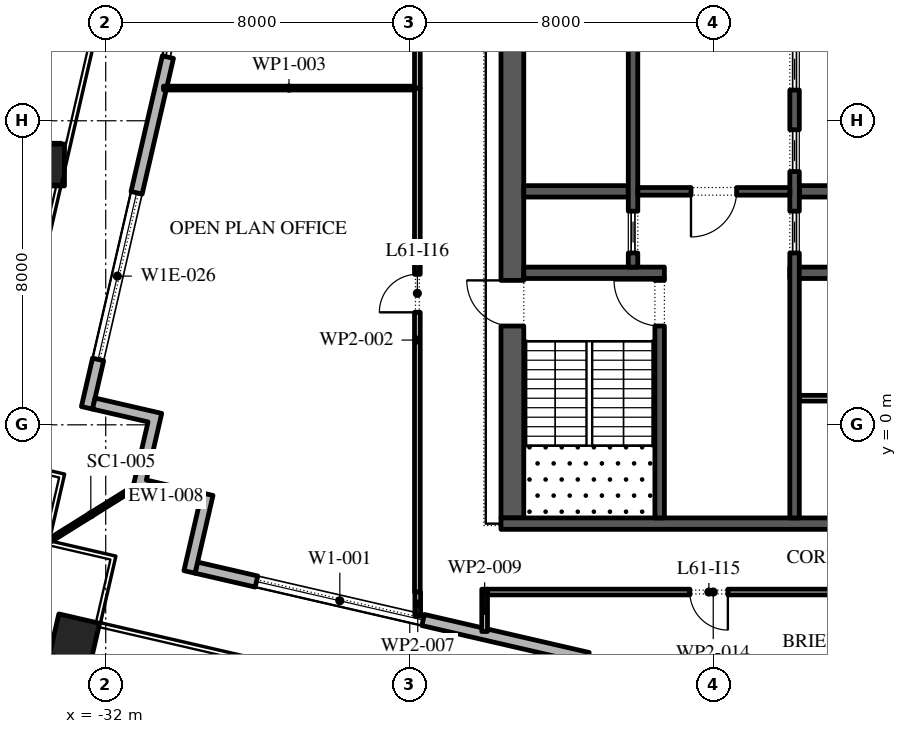
"""IFC4 building model, lengths in metres.
Left out: names, types, materials, properties, quantities, classifications, styles, units other than length and angle.
Written with IfcOpenShell. Run it as: python <this file> out.ifc"""

import sys

from ifc_helpers import new_model, si_unit, direction, frame, frame_2d, origin, origin_2d, place, context, subcontext, project, spatial, polyline, rectangle, outline, extrude, element, fill, save


model = new_model("IFC4")
c1 = context("Model", 3, precision=1e-05, world=origin(), true_north=direction((0.0, 1.0)))
c2 = subcontext(c1, "Body", "Model", "MODEL_VIEW")
j1 = project(units=[si_unit("LENGTHUNIT", "METRE"), si_unit("PLANEANGLEUNIT", "RADIAN")], contexts=[c1])
p1 = place(None, origin())
s1 = spatial("IfcSite", under=j1, at=p1, CompositionType="ELEMENT")
p2 = place(p1, origin())
s2 = spatial("IfcBuilding", under=s1, at=p2, CompositionType="ELEMENT")
p3 = place(p2, frame((0.0, 0.0, 280.8)))
s3 = spatial("IfcBuildingStorey", under=s2, at=p3, CompositionType="ELEMENT", Elevation=280.8)
p4 = place(p3, frame((-32.821, -5.635, 0.0), z_axis=(0.0, 0.0, 1.0), x_axis=(0.974370064785, -0.224951054344, 0.0)))
e1 = element("IfcColumn", 1, at=p4, inside=s3, PredefinedType="COLUMN", context=c2, shape_type="SweptSolid", body=[
    extrude(rectangle(XDim=1.1, YDim=1.1, at=origin_2d()), origin(), (0.0, 0.0, 1.0), 4.2),
])
p5 = place(p3, frame((-33.636, 6.836, 0.0), z_axis=(0.002906224189, 0.012671137464, 0.999915494498), x_axis=(-0.974691740237, 0.22355315143, 0.0)))
e2 = element("IfcColumn", 2, at=p5, inside=s3, PredefinedType="COLUMN", context=c2, shape_type="SweptSolid", body=[
    extrude(rectangle(XDim=1.1, YDim=1.1, at=origin_2d()), origin(), (0.0, 0.0, 1.0), 4.2),
])
p6 = place(p3, frame((-29.616, -3.758, 0.0), z_axis=(0.0, 0.0, 1.0), x_axis=(0.974370532314, -0.224949029246, 0.0)))
e3 = element("IfcWall", 3, at=p6, inside=s3, PredefinedType="STANDARD", context=c2, shape_type="SweptSolid", body=[
    extrude(rectangle(XDim=48.0, YDim=0.3, at=frame_2d((24.0, 0.0))), origin(), (0.0, 0.0, 1.0), 4.0),
])
p7 = place(p6, frame((1.625, 0.0, 0.45)))
e4 = element("IfcOpeningElement", 4, at=p7, cuts=e3, PredefinedType="OPENING", context=c2, shape_type="SweptSolid", body=[
    extrude(rectangle(XDim=4.5, YDim=3.05, at=frame_2d((2.25, 1.525))), frame((0.0, 0.16, 0.0), z_axis=(0.0, -1.0, 0.0), x_axis=(1.0, 0.0, 0.0)), (0.0, 0.0, 1.0), 0.32),
])
p8 = place(p6, frame((10.575, 0.0, 0.0)))
e5 = element("IfcOpeningElement", 5, at=p8, cuts=e3, PredefinedType="OPENING", context=c2, shape_type="SweptSolid", body=[
    extrude(rectangle(XDim=2.4, YDim=3.5, at=frame_2d((1.2, 1.75))), frame((0.0, 0.16, 0.0), z_axis=(0.0, -1.0, 0.0), x_axis=(1.0, 0.0, 0.0)), (0.0, 0.0, 1.0), 0.32),
])
p9 = place(p6, frame((17.575, 0.0, 0.45)))
e6 = element("IfcOpeningElement", 6, at=p9, cuts=e3, PredefinedType="OPENING", context=c2, shape_type="SweptSolid", body=[
    extrude(rectangle(XDim=4.5, YDim=3.0, at=frame_2d((2.25, 1.5))), frame((0.0, 0.16, 0.0), z_axis=(0.0, -1.0, 0.0), x_axis=(1.0, 0.0, 0.0)), (0.0, 0.0, 1.0), 0.32),
])
p10 = place(p6, frame((25.625, 0.0, 0.45)))
e7 = element("IfcOpeningElement", 7, at=p10, cuts=e3, PredefinedType="OPENING", context=c2, shape_type="SweptSolid", body=[
    extrude(rectangle(XDim=4.5, YDim=2.95, at=frame_2d((2.25, 1.475))), frame((0.0, 0.16, 0.0), z_axis=(0.0, -1.0, 0.0), x_axis=(1.0, 0.0, 0.0)), (0.0, 0.0, 1.0), 0.32),
])
p11 = place(p6, frame((33.675, 0.0, 0.45)))
e8 = element("IfcOpeningElement", 8, at=p11, cuts=e3, PredefinedType="OPENING", context=c2, shape_type="SweptSolid", body=[
    extrude(rectangle(XDim=4.5, YDim=2.825, at=frame_2d((2.25, 1.413))), frame((0.0, 0.16, 0.0), z_axis=(0.0, -1.0, 0.0), x_axis=(1.0, 0.0, 0.0)), (0.0, 0.0, 1.0), 0.32),
])
p12 = place(p6, frame((42.775, 0.0, 0.0)))
e9 = element("IfcOpeningElement", 9, at=p12, cuts=e3, PredefinedType="OPENING", context=c2, shape_type="SweptSolid", body=[
    extrude(rectangle(XDim=2.4, YDim=3.5, at=frame_2d((1.2, 1.75))), frame((0.0, 0.16, 0.0), z_axis=(0.0, -1.0, 0.0), x_axis=(1.0, 0.0, 0.0)), (0.0, 0.0, 1.0), 0.32),
])
p13 = place(p3, frame((-21.359, 48.678, 0.0), z_axis=(0.0, 0.0, 1.0), x_axis=(-0.224949198343, -0.974370493275, 0.0)))
e10 = element("IfcWall", 10, at=p13, inside=s3, PredefinedType="STANDARD", context=c2, shape_type="SweptSolid", body=[
    extrude(rectangle(XDim=49.5, YDim=0.3, at=frame_2d((24.75, 0.0))), origin(), (0.0, 0.0, 1.0), 4.0),
])
p14 = place(p13, frame((1.157, 0.0, 0.45)))
e11 = element("IfcOpeningElement", 11, at=p14, cuts=e10, PredefinedType="OPENING", context=c2, shape_type="SweptSolid", body=[
    extrude(rectangle(XDim=4.5, YDim=3.05, at=frame_2d((2.25, 1.525))), frame((0.0, 0.16, 0.0), z_axis=(0.0, -1.0, 0.0), x_axis=(1.0, 0.0, 0.0)), (0.0, 0.0, 1.0), 0.32),
])
p15 = place(p13, frame((9.171, 0.0, 0.0)))
e12 = element("IfcOpeningElement", 12, at=p15, cuts=e10, PredefinedType="OPENING", context=c2, shape_type="SweptSolid", body=[
    extrude(rectangle(XDim=2.4, YDim=3.5, at=frame_2d((1.2, 1.75))), frame((0.0, 0.16, 0.0), z_axis=(0.0, -1.0, 0.0), x_axis=(1.0, 0.0, 0.0)), (0.0, 0.0, 1.0), 0.32),
])
p16 = place(p13, frame((15.236, 0.0, 0.45)))
e13 = element("IfcOpeningElement", 13, at=p16, cuts=e10, PredefinedType="OPENING", context=c2, shape_type="SweptSolid", body=[
    extrude(rectangle(XDim=4.5, YDim=3.05, at=frame_2d((2.25, 1.525))), frame((0.0, 0.16, 0.0), z_axis=(0.0, -1.0, 0.0), x_axis=(1.0, 0.0, 0.0)), (0.0, 0.0, 1.0), 0.32),
])
p17 = place(p13, frame((22.35, 0.0, 0.45)))
e14 = element("IfcOpeningElement", 14, at=p17, cuts=e10, PredefinedType="OPENING", context=c2, shape_type="SweptSolid", body=[
    extrude(rectangle(XDim=4.5, YDim=3.05, at=frame_2d((2.25, 1.525))), frame((0.0, 0.16, 0.0), z_axis=(0.0, -1.0, 0.0), x_axis=(1.0, 0.0, 0.0)), (0.0, 0.0, 1.0), 0.32),
])
p18 = place(p13, frame((29.464, 0.0, 0.45)))
e15 = element("IfcOpeningElement", 15, at=p18, cuts=e10, PredefinedType="OPENING", context=c2, shape_type="SweptSolid", body=[
    extrude(rectangle(XDim=4.5, YDim=3.05, at=frame_2d((2.25, 1.525))), frame((0.0, 0.16, 0.0), z_axis=(0.0, -1.0, 0.0), x_axis=(1.0, 0.0, 0.0)), (0.0, 0.0, 1.0), 0.32),
])
p19 = place(p13, frame((37.628, 0.0, 0.0)))
e16 = element("IfcOpeningElement", 16, at=p19, cuts=e10, PredefinedType="OPENING", context=c2, shape_type="SweptSolid", body=[
    extrude(rectangle(XDim=2.4, YDim=3.325, at=frame_2d((1.2, 1.663))), frame((0.0, 0.16, 0.0), z_axis=(0.0, -1.0, 0.0), x_axis=(1.0, 0.0, 0.0)), (0.0, 0.0, 1.0), 0.32),
])
p20 = place(p13, frame((43.693, 0.0, 0.45)))
e17 = element("IfcOpeningElement", 17, at=p20, cuts=e10, PredefinedType="OPENING", context=c2, shape_type="SweptSolid", body=[
    extrude(rectangle(XDim=4.5, YDim=2.825, at=frame_2d((2.25, 1.413))), frame((0.0, 0.16, 0.0), z_axis=(0.0, -1.0, 0.0), x_axis=(1.0, 0.0, 0.0)), (0.0, 0.0, 1.0), 0.32),
])
p21 = place(p3, origin())
e18 = element("IfcWall", 18, at=p21, inside=s3, PredefinedType="STANDARD", context=c2, shape_type="SweptSolid", body=[
    extrude(outline(polyline([(-31.291, -1.678), (-30.886, 0.076), (-32.348, 0.413), (-32.28, 0.705), (-30.526, 0.301), (-30.931, -1.453), (-29.177, -1.858), (-29.65, -3.905), (-29.942, -3.837), (-29.537, -2.083), (-31.291, -1.678)])), origin(), (0.0, 0.0, 1.0), 4.0),
])
p22 = place(p3, frame((-31.291, -1.678, -0.05), z_axis=(0.0, 0.0, 1.0), x_axis=(-0.84807753525, -0.529872148923, 0.0)))
e19 = element("IfcWall", 19, at=p22, inside=s3, PredefinedType="STANDARD", context=c2, shape_type="SweptSolid", body=[
    extrude(rectangle(XDim=2.596, YDim=0.1, at=frame_2d((1.298, 0.0))), origin(), (0.0, 0.0, 1.0), 4.05),
])
p23 = place(p3, frame((-21.3, -2.45, 0.0), z_axis=(0.0, 0.0, 1.0), x_axis=(0.0, 1.0, 0.0)))
e20 = element("IfcWall", 20, at=p23, inside=s3, PredefinedType="SHEAR", context=c2, shape_type="SweptSolid", body=[
    extrude(rectangle(XDim=27.9, YDim=0.6, at=frame_2d((13.95, 0.0))), origin(), (0.0, 0.0, 1.0), 4.0),
])
p24 = place(p23, frame((5.05, 0.0, 0.0)))
e21 = element("IfcOpeningElement", 21, at=p24, cuts=e20, PredefinedType="OPENING", context=c2, shape_type="SweptSolid", body=[
    extrude(rectangle(XDim=1.2, YDim=2.1, at=frame_2d((0.6, 1.05))), frame((0.0, 0.31, 0.0), z_axis=(0.0, -1.0, 0.0), x_axis=(1.0, 0.0, 0.0)), (0.0, 0.0, 1.0), 0.62),
])
p25 = place(p23, frame((21.65, 0.0, 0.0)))
e22 = element("IfcOpeningElement", 22, at=p25, cuts=e20, PredefinedType="OPENING", context=c2, shape_type="SweptSolid", body=[
    extrude(rectangle(XDim=1.2, YDim=2.1, at=frame_2d((0.6, 1.05))), frame((0.0, 0.31, 0.0), z_axis=(0.0, -1.0, 0.0), x_axis=(1.0, 0.0, 0.0)), (0.0, 0.0, 1.0), 0.62),
])
p26 = place(p3, frame((-21.6, -2.6, 0.0), z_axis=(0.0, 0.0, 1.0), x_axis=(1.0, 0.0, 0.0)))
e23 = element("IfcWall", 23, at=p26, inside=s3, PredefinedType="SHEAR", context=c2, shape_type="SweptSolid", body=[
    extrude(rectangle(XDim=11.2, YDim=0.3, at=frame_2d((5.6, 0.0))), origin(), (0.0, 0.0, 1.0), 4.0),
])
p27 = place(p3, frame((-21.0, 4.0, 0.0), z_axis=(0.0, 0.0, 1.0), x_axis=(1.0, 0.0, 0.0)))
e24 = element("IfcWall", 24, at=p27, inside=s3, PredefinedType="SHEAR", context=c2, shape_type="SweptSolid", body=[
    extrude(rectangle(XDim=3.7, YDim=0.3, at=frame_2d((1.85, 0.0))), origin(), (0.0, 0.0, 1.0), 4.0),
])
p28 = place(p3, frame((-17.425, -2.45, 0.0), z_axis=(0.0, 0.0, 1.0), x_axis=(0.0, 1.0, 0.0)))
e25 = element("IfcWall", 25, at=p28, inside=s3, PredefinedType="SHEAR", context=c2, shape_type="SweptSolid", body=[
    extrude(rectangle(XDim=6.3, YDim=0.25, at=frame_2d((3.15, 0.0))), origin(), (0.0, 0.0, 1.0), 4.0),
])
p29 = place(p28, frame((5.05, 0.0, 0.0)))
e26 = element("IfcOpeningElement", 26, at=p29, cuts=e25, PredefinedType="OPENING", context=c2, shape_type="SweptSolid", body=[
    extrude(rectangle(XDim=1.2, YDim=2.1, at=frame_2d((0.6, 1.05))), frame((0.0, 0.135, 0.0), z_axis=(0.0, -1.0, 0.0), x_axis=(1.0, 0.0, 0.0)), (0.0, 0.0, 1.0), 0.27),
])
p30 = place(p3, frame((-21.0, 6.143, 0.0), z_axis=(0.0, 0.0, 1.0), x_axis=(1.0, 0.0, 0.0)))
e27 = element("IfcWall", 27, at=p30, inside=s3, PredefinedType="SHEAR", context=c2, shape_type="SweptSolid", body=[
    extrude(rectangle(XDim=2.75, YDim=0.3, at=frame_2d((1.375, 0.0))), origin(), (0.0, 0.0, 1.0), 4.0),
])
p31 = place(p3, frame((-18.125, 4.15, 0.0), z_axis=(0.0, 0.0, 1.0), x_axis=(0.0, 1.0, 0.0)))
e28 = element("IfcWall", 28, at=p31, inside=s3, PredefinedType="SHEAR", context=c2, shape_type="SweptSolid", body=[
    extrude(rectangle(XDim=14.7, YDim=0.25, at=frame_2d((7.35, 0.0))), origin(), (0.0, 0.0, 1.0), 4.0),
])
p32 = place(p31, frame((6.9, 0.0, 0.0)))
e29 = element("IfcOpeningElement", 29, at=p32, cuts=e28, PredefinedType="OPENING", context=c2, shape_type="SweptSolid", body=[
    extrude(rectangle(XDim=0.9, YDim=2.1, at=frame_2d((0.45, 1.05))), frame((0.0, 0.135, 0.0), z_axis=(0.0, -1.0, 0.0), x_axis=(1.0, 0.0, 0.0)), (0.0, 0.0, 1.0), 0.27),
])
p33 = place(p31, frame((0.371, 0.0, 0.0)))
e30 = element("IfcOpeningElement", 30, at=p33, cuts=e28, PredefinedType="OPENING", context=c2, shape_type="SweptSolid", body=[
    extrude(rectangle(XDim=1.1, YDim=2.1, at=frame_2d((0.55, 1.05))), frame((0.0, 0.135, 0.0), z_axis=(0.0, -1.0, 0.0), x_axis=(1.0, 0.0, 0.0)), (0.0, 0.0, 1.0), 0.27),
])
p34 = place(p31, frame((13.229, 0.0, 0.0)))
e31 = element("IfcOpeningElement", 31, at=p34, cuts=e28, PredefinedType="OPENING", context=c2, shape_type="SweptSolid", body=[
    extrude(rectangle(XDim=1.1, YDim=2.1, at=frame_2d((0.55, 1.05))), frame((0.0, 0.135, 0.0), z_axis=(0.0, -1.0, 0.0), x_axis=(1.0, 0.0, 0.0)), (0.0, 0.0, 1.0), 0.27),
])
p35 = place(p3, frame((-14.0, 4.0, 0.0), z_axis=(0.0, 0.0, 1.0), x_axis=(1.0, 0.0, 0.0)))
e32 = element("IfcWall", 32, at=p35, inside=s3, PredefinedType="SHEAR", context=c2, shape_type="SweptSolid", body=[
    extrude(rectangle(XDim=3.0, YDim=0.3, at=frame_2d((1.5, 0.0))), origin(), (0.0, 0.0, 1.0), 4.0),
])
p36 = place(p3, frame((-13.75, 6.143, 0.0), z_axis=(0.0, 0.0, 1.0), x_axis=(1.0, 0.0, 0.0)))
e33 = element("IfcWall", 33, at=p36, inside=s3, PredefinedType="SHEAR", context=c2, shape_type="SweptSolid", body=[
    extrude(rectangle(XDim=2.75, YDim=0.3, at=frame_2d((1.375, 0.0))), origin(), (0.0, 0.0, 1.0), 4.0),
])
p37 = place(p3, frame((-13.875, -2.45, 0.0), z_axis=(0.0, 0.0, 1.0), x_axis=(0.0, 1.0, 0.0)))
e34 = element("IfcWall", 34, at=p37, inside=s3, PredefinedType="SHEAR", context=c2, shape_type="SweptSolid", body=[
    extrude(rectangle(XDim=21.3, YDim=0.25, at=frame_2d((10.65, 0.0))), origin(), (0.0, 0.0, 1.0), 4.0),
])
p38 = place(p37, frame((17.786, 0.0, 0.0)))
e35 = element("IfcOpeningElement", 35, at=p38, cuts=e34, PredefinedType="OPENING", context=c2, shape_type="SweptSolid", body=[
    extrude(rectangle(XDim=0.9, YDim=2.1, at=frame_2d((0.45, 1.05))), frame((0.0, 0.135, 0.0), z_axis=(0.0, -1.0, 0.0), x_axis=(1.0, 0.0, 0.0)), (0.0, 0.0, 1.0), 0.27),
])
p39 = place(p37, frame((6.971, 0.0, 0.0)))
e36 = element("IfcOpeningElement", 36, at=p39, cuts=e34, PredefinedType="OPENING", context=c2, shape_type="SweptSolid", body=[
    extrude(rectangle(XDim=1.1, YDim=2.1, at=frame_2d((0.55, 1.05))), frame((0.0, 0.135, 0.0), z_axis=(0.0, -1.0, 0.0), x_axis=(1.0, 0.0, 0.0)), (0.0, 0.0, 1.0), 0.27),
])
p40 = place(p37, frame((9.114, 0.0, 0.0)))
e37 = element("IfcOpeningElement", 37, at=p40, cuts=e34, PredefinedType="OPENING", context=c2, shape_type="SweptSolid", body=[
    extrude(rectangle(XDim=1.1, YDim=2.1, at=frame_2d((0.55, 1.05))), frame((0.0, 0.135, 0.0), z_axis=(0.0, -1.0, 0.0), x_axis=(1.0, 0.0, 0.0)), (0.0, 0.0, 1.0), 0.27),
])
p41 = place(p37, frame((11.257, 0.0, 0.0)))
e38 = element("IfcOpeningElement", 38, at=p41, cuts=e34, PredefinedType="OPENING", context=c2, shape_type="SweptSolid", body=[
    extrude(rectangle(XDim=1.1, YDim=2.1, at=frame_2d((0.55, 1.05))), frame((0.0, 0.135, 0.0), z_axis=(0.0, -1.0, 0.0), x_axis=(1.0, 0.0, 0.0)), (0.0, 0.0, 1.0), 0.27),
])
p42 = place(p37, frame((13.4, 0.0, 0.0)))
e39 = element("IfcOpeningElement", 39, at=p42, cuts=e34, PredefinedType="OPENING", context=c2, shape_type="SweptSolid", body=[
    extrude(rectangle(XDim=1.1, YDim=2.1, at=frame_2d((0.55, 1.05))), frame((0.0, 0.135, 0.0), z_axis=(0.0, -1.0, 0.0), x_axis=(1.0, 0.0, 0.0)), (0.0, 0.0, 1.0), 0.27),
])
p43 = place(p3, frame((-18.0, 6.143, 0.0), z_axis=(0.0, 0.0, 1.0), x_axis=(1.0, 0.0, 0.0)))
e40 = element("IfcWall", 40, at=p43, inside=s3, PredefinedType="SHEAR", context=c2, shape_type="SweptSolid", body=[
    extrude(rectangle(XDim=4.0, YDim=0.2, at=frame_2d((2.0, 0.0))), origin(), (0.0, 0.0, 1.0), 4.0),
])
p44 = place(p43, frame((1.4, 0.0, 0.0)))
e41 = element("IfcOpeningElement", 41, at=p44, cuts=e40, PredefinedType="OPENING", context=c2, shape_type="SweptSolid", body=[
    extrude(rectangle(XDim=1.2, YDim=2.1, at=frame_2d((0.6, 1.05))), frame((0.0, 0.11, 0.0), z_axis=(0.0, -1.0, 0.0), x_axis=(1.0, 0.0, 0.0)), (0.0, 0.0, 1.0), 0.22),
])
p45 = place(p3, frame((-13.75, 0.7, 0.0), z_axis=(0.0, 0.0, 1.0), x_axis=(1.0, 0.0, 0.0)))
e42 = element("IfcWall", 42, at=p45, inside=s3, PredefinedType="PARTITIONING", context=c2, shape_type="SweptSolid", body=[
    extrude(rectangle(XDim=2.75, YDim=0.15, at=frame_2d((1.375, 0.0))), origin(), (0.0, 0.0, 1.0), 4.0),
])
p46 = place(p3, frame((-23.8, -4.4, 0.0), z_axis=(0.0, 0.0, 1.0), x_axis=(0.0, 1.0, 0.0)))
e43 = element("IfcWall", 43, at=p46, inside=s3, PredefinedType="PARTITIONING", context=c2, shape_type="SweptSolid", body=[
    extrude(rectangle(XDim=13.26, YDim=0.15, at=frame_2d((6.63, 0.0))), origin(), (0.0, 0.0, 1.0), 4.0),
])
p47 = place(p46, frame((7.36, 0.0, 0.0)))
e44 = element("IfcOpeningElement", 44, at=p47, cuts=e43, PredefinedType="OPENING", context=c2, shape_type="SweptSolid", body=[
    extrude(rectangle(XDim=1.0, YDim=2.1, at=frame_2d((0.5, 1.05))), frame((0.0, 0.085, 0.0), z_axis=(0.0, -1.0, 0.0), x_axis=(1.0, 0.0, 0.0)), (0.0, 0.0, 1.0), 0.17),
])
p48 = place(p3, frame((-23.875, 8.86, 0.0), z_axis=(0.0, 0.0, 1.0), x_axis=(-1.0, 0.0, 0.0)))
e45 = element("IfcWall", 45, at=p48, inside=s3, PredefinedType="PARTITIONING", context=c2, shape_type="SweptSolid", body=[
    extrude(rectangle(XDim=6.605, YDim=0.1, at=frame_2d((3.302, 0.0))), origin(), (0.0, 0.0, 1.0), 4.0),
])
p49 = place(p3, frame((-23.8, 8.86, 0.0), z_axis=(0.0, 0.0, 1.0), x_axis=(0.0, 1.0, 0.0)))
e46 = element("IfcWall", 46, at=p49, inside=s3, PredefinedType="PARTITIONING", context=c2, shape_type="SweptSolid", body=[
    extrude(rectangle(XDim=20.875, YDim=0.15, at=frame_2d((10.438, 0.0))), origin(), (0.0, 0.0, 1.0), 4.0),
])
p50 = place(p49, frame((7.9, 0.0, 0.0)))
e47 = element("IfcOpeningElement", 47, at=p50, cuts=e46, PredefinedType="OPENING", context=c2, shape_type="SweptSolid", body=[
    extrude(rectangle(XDim=1.0, YDim=2.1, at=frame_2d((0.5, 1.05))), frame((0.0, 0.085, 0.0), z_axis=(0.0, -1.0, 0.0), x_axis=(1.0, 0.0, 0.0)), (0.0, 0.0, 1.0), 0.17),
])
p51 = place(p3, frame((-23.79, -5.032, 0.0), z_axis=(0.0, 0.0, 1.0), x_axis=(0.0, 1.0, 0.0)))
e48 = element("IfcWall", 48, at=p51, inside=s3, PredefinedType="PARTITIONING", context=c2, shape_type="SweptSolid", body=[
    extrude(rectangle(XDim=0.632, YDim=0.15, at=frame_2d((0.316, 0.0))), origin(), (0.0, 0.0, 1.0), 4.0),
])
p52 = place(p3, frame((-22.03, -4.325, 0.0), z_axis=(0.0, 0.0, 1.0), x_axis=(0.0, -1.0, 0.0)))
e49 = element("IfcWall", 49, at=p52, inside=s3, PredefinedType="PARTITIONING", context=c2, shape_type="SweptSolid", body=[
    extrude(rectangle(XDim=1.113, YDim=0.15, at=frame_2d((0.557, 0.0))), origin(), (0.0, 0.0, 1.0), 4.0),
])
p53 = place(p3, frame((-10.075, -4.4, 0.0), z_axis=(0.0, 0.0, 1.0), x_axis=(-1.0, 0.0, 0.0)))
e50 = element("IfcWall", 50, at=p53, inside=s3, PredefinedType="PARTITIONING", context=c2, shape_type="SweptSolid", body=[
    extrude(rectangle(XDim=11.88, YDim=0.15, at=frame_2d((5.94, 0.0))), origin(), (0.0, 0.0, 1.0), 4.0),
])
p54 = place(p53, frame((5.555, 0.0, 0.0)))
e51 = element("IfcOpeningElement", 51, at=p54, cuts=e50, PredefinedType="OPENING", context=c2, shape_type="SweptSolid", body=[
    extrude(rectangle(XDim=1.0, YDim=2.1, at=frame_2d((0.5, 1.05))), frame((0.0, 0.085, 0.0), z_axis=(0.0, -1.0, 0.0), x_axis=(1.0, 0.0, 0.0)), (0.0, 0.0, 1.0), 0.17),
])
p55 = place(p7, origin())
e52 = element("IfcWindow", 52, at=p55, inside=s3, PartitioningType="DOUBLE_PANEL_VERTICAL", PredefinedType="WINDOW", context=c2, shape_type="SweptSolid", body=[
    extrude(rectangle(XDim=4.5, YDim=3.05, at=frame_2d((2.25, 1.525))), frame((0.0, 0.03, 0.0), z_axis=(0.0, -1.0, 0.0), x_axis=(1.0, 0.0, 0.0)), (0.0, 0.0, 1.0), 0.06),
])
fill(e4, e52)
p56 = place(p19, origin())
e53 = element("IfcDoor", 53, at=p56, inside=s3, OperationType="DOUBLE_DOOR_SLIDING", PredefinedType="DOOR", context=c2, shape_type="SweptSolid", body=[
    extrude(rectangle(XDim=2.4, YDim=3.325, at=frame_2d((1.2, 1.663))), frame((0.0, 0.025, 0.0), z_axis=(0.0, -1.0, 0.0), x_axis=(1.0, 0.0, 0.0)), (0.0, 0.0, 1.0), 0.05),
])
fill(e16, e53)
p57 = place(p20, origin())
e54 = element("IfcWindow", 54, at=p57, inside=s3, PartitioningType="DOUBLE_PANEL_VERTICAL", PredefinedType="WINDOW", context=c2, shape_type="SweptSolid", body=[
    extrude(rectangle(XDim=4.5, YDim=2.825, at=frame_2d((2.25, 1.413))), frame((0.0, 0.03, 0.0), z_axis=(0.0, -1.0, 0.0), x_axis=(1.0, 0.0, 0.0)), (0.0, 0.0, 1.0), 0.06),
])
fill(e17, e54)
p58 = place(p33, origin())
e55 = element("IfcDoor", 55, at=p58, inside=s3, OperationType="SLIDING_TO_LEFT", PredefinedType="DOOR", context=c2, shape_type="SweptSolid", body=[
    extrude(rectangle(XDim=1.1, YDim=2.1, at=frame_2d((0.55, 1.05))), frame((0.0, 0.025, 0.0), z_axis=(0.0, -1.0, 0.0), x_axis=(1.0, 0.0, 0.0)), (0.0, 0.0, 1.0), 0.05),
])
fill(e30, e55)
p59 = place(p39, origin())
e56 = element("IfcDoor", 56, at=p59, inside=s3, OperationType="SLIDING_TO_LEFT", PredefinedType="DOOR", context=c2, shape_type="SweptSolid", body=[
    extrude(rectangle(XDim=1.1, YDim=2.1, at=frame_2d((0.55, 1.05))), frame((0.0, 0.025, 0.0), z_axis=(0.0, -1.0, 0.0), x_axis=(1.0, 0.0, 0.0)), (0.0, 0.0, 1.0), 0.05),
])
fill(e36, e56)
p60 = place(p40, origin())
e57 = element("IfcDoor", 57, at=p60, inside=s3, OperationType="SLIDING_TO_LEFT", PredefinedType="DOOR", context=c2, shape_type="SweptSolid", body=[
    extrude(rectangle(XDim=1.1, YDim=2.1, at=frame_2d((0.55, 1.05))), frame((0.0, 0.025, 0.0), z_axis=(0.0, -1.0, 0.0), x_axis=(1.0, 0.0, 0.0)), (0.0, 0.0, 1.0), 0.05),
])
fill(e37, e57)
p61 = place(p41, origin())
e58 = element("IfcDoor", 58, at=p61, inside=s3, OperationType="SLIDING_TO_LEFT", PredefinedType="DOOR", context=c2, shape_type="SweptSolid", body=[
    extrude(rectangle(XDim=1.1, YDim=2.1, at=frame_2d((0.55, 1.05))), frame((0.0, 0.025, 0.0), z_axis=(0.0, -1.0, 0.0), x_axis=(1.0, 0.0, 0.0)), (0.0, 0.0, 1.0), 0.05),
])
fill(e38, e58)
p62 = place(p44, frame((1.2, 0.0, 0.0), z_axis=(0.0, 0.0, 1.0), x_axis=(-1.0, 0.0, 0.0)))
e59 = element("IfcDoor", 59, at=p62, inside=s3, OperationType="SINGLE_SWING_LEFT", PredefinedType="DOOR", context=c2, shape_type="SweptSolid", body=[
    extrude(rectangle(XDim=1.2, YDim=2.1, at=frame_2d((0.6, 1.05))), frame((0.0, 0.025, 0.0), z_axis=(0.0, -1.0, 0.0), x_axis=(1.0, 0.0, 0.0)), (0.0, 0.0, 1.0), 0.05),
])
fill(e41, e59)
p63 = place(p29, origin())
e60 = element("IfcDoor", 60, at=p63, inside=s3, OperationType="SINGLE_SWING_LEFT", PredefinedType="DOOR", context=c2, shape_type="SweptSolid", body=[
    extrude(rectangle(XDim=1.2, YDim=2.1, at=frame_2d((0.6, 1.05))), frame((0.0, 0.025, 0.0), z_axis=(0.0, -1.0, 0.0), x_axis=(1.0, 0.0, 0.0)), (0.0, 0.0, 1.0), 0.05),
])
fill(e26, e60)
p64 = place(p24, origin())
e61 = element("IfcDoor", 61, at=p64, inside=s3, OperationType="SINGLE_SWING_LEFT", PredefinedType="DOOR", context=c2, shape_type="SweptSolid", body=[
    extrude(rectangle(XDim=1.2, YDim=2.1, at=frame_2d((0.6, 1.05))), frame((0.0, 0.025, 0.0), z_axis=(0.0, -1.0, 0.0), x_axis=(1.0, 0.0, 0.0)), (0.0, 0.0, 1.0), 0.05),
])
fill(e21, e61)
p65 = place(p54, origin())
e62 = element("IfcDoor", 62, at=p65, inside=s3, OperationType="SINGLE_SWING_RIGHT", PredefinedType="DOOR", context=c2, shape_type="SweptSolid", body=[
    extrude(rectangle(XDim=1.0, YDim=2.1, at=frame_2d((0.5, 1.05))), frame((0.0, 0.025, 0.0), z_axis=(0.0, -1.0, 0.0), x_axis=(1.0, 0.0, 0.0)), (0.0, 0.0, 1.0), 0.05),
])
fill(e51, e62)
p66 = place(p47, origin())
e63 = element("IfcDoor", 63, at=p66, inside=s3, OperationType="SINGLE_SWING_RIGHT", PredefinedType="DOOR", context=c2, shape_type="SweptSolid", body=[
    extrude(rectangle(XDim=1.0, YDim=2.1, at=frame_2d((0.5, 1.05))), frame((0.0, 0.025, 0.0), z_axis=(0.0, -1.0, 0.0), x_axis=(1.0, 0.0, 0.0)), (0.0, 0.0, 1.0), 0.05),
])
fill(e44, e63)
save(model, sys.argv[1])
